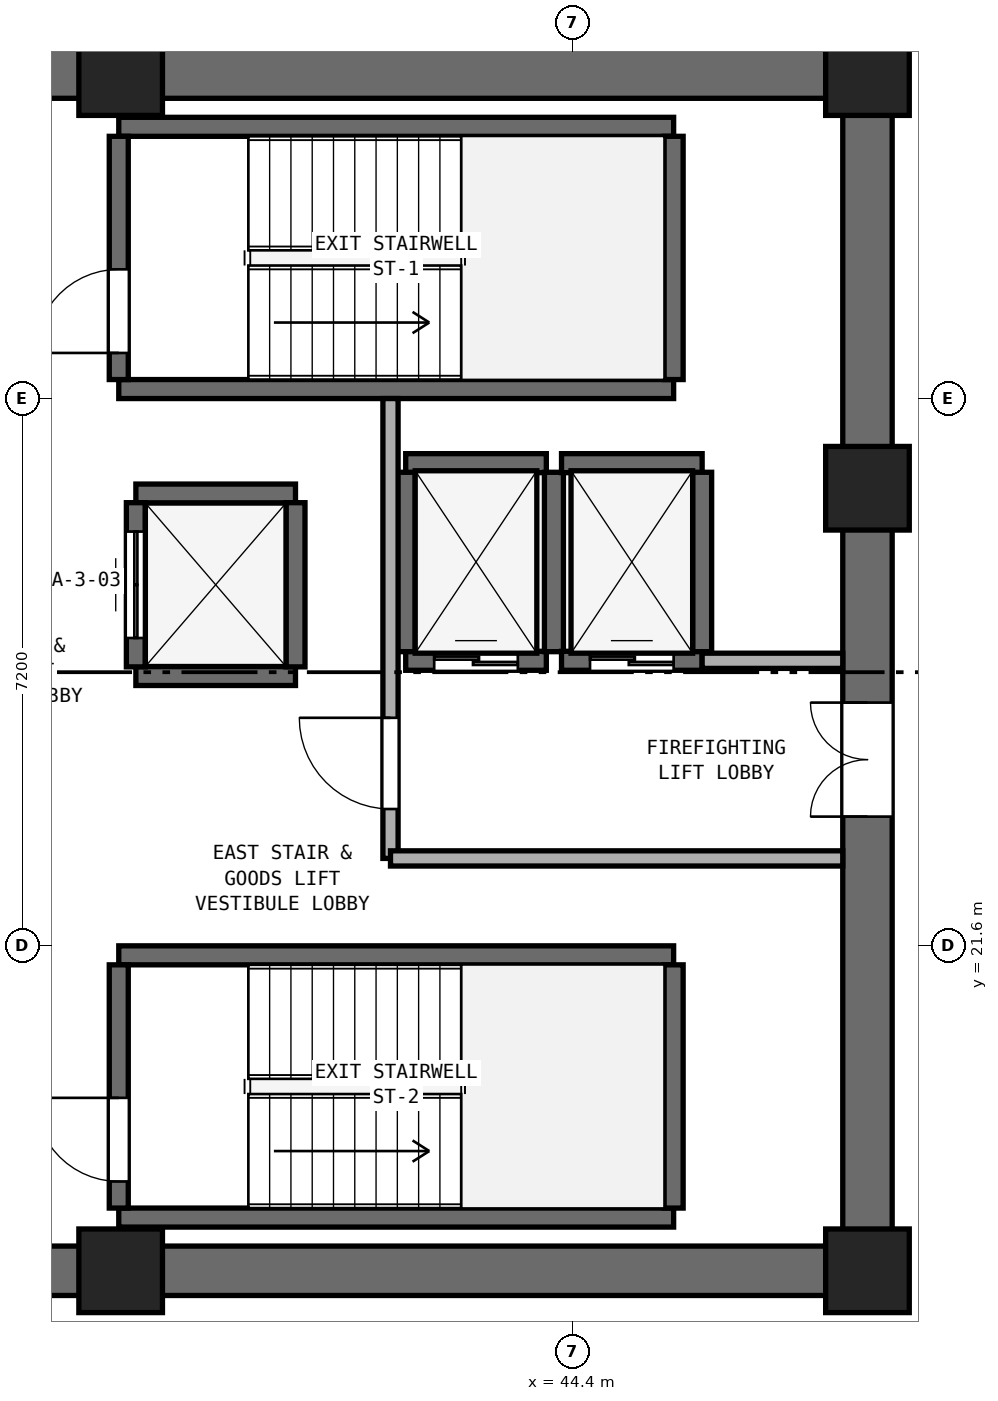
"""IFC4 building model, lengths in metres.
Left out: names, types, materials, properties, quantities, classifications, styles, units other than length and angle.
Written with IfcOpenShell. Run it as: python <this file> out.ifc"""

import sys

from ifc_helpers import new_model, si_unit, direction, frame, frame_2d, origin, origin_2d, place, context, subcontext, project, spatial, rectangle, extrude, element, fill, save


model = new_model("IFC4")
c1 = context("Model", 3, precision=1e-05, world=origin(), true_north=direction((0.0, 1.0)))
c2 = subcontext(c1, "Body", "Model", "MODEL_VIEW")
j1 = project(units=[si_unit("LENGTHUNIT", "METRE"), si_unit("PLANEANGLEUNIT", "RADIAN")], contexts=[c1])
p1 = place(None, origin())
s1 = spatial("IfcSite", under=j1, at=p1, CompositionType="ELEMENT")
p2 = place(p1, origin())
s2 = spatial("IfcBuilding", under=s1, at=p2, CompositionType="ELEMENT")
p3 = place(p2, frame((0.0, 0.0, 116.2)))
s3 = spatial("IfcBuildingStorey", under=s2, at=p3, CompositionType="ELEMENT", Elevation=116.2)
for number, where, z_axis, x_axis in (
    (1, (25.4, 17.325, 0.0), (0.0, 0.0, 1.0), (1.0, 0.0, 0.0)),
    (2, (25.4, 33.075, 0.0), (0.0, 0.0, 1.0), (1.0, 0.0, 0.0)),
):
    element("IfcWall", number, at=place(p3, frame(where, z_axis=z_axis, x_axis=x_axis)), inside=s3, PredefinedType="SHEAR", context=c2, shape_type="SweptSolid", body=[
        extrude(rectangle(XDim=23.2, YDim=0.65, at=frame_2d((11.6, 0.0))), origin(), (0.0, 0.0, 1.0), 3.4),
    ])
p4 = place(p3, frame((48.275, 17.65, 0.0), z_axis=(0.0, 0.0, 1.0), x_axis=(0.0, 1.0, 0.0)))
e3 = element("IfcWall", 3, at=p4, inside=s3, PredefinedType="SHEAR", context=c2, shape_type="SweptSolid", body=[
    extrude(rectangle(XDim=15.1, YDim=0.65, at=frame_2d((7.55, 0.0))), origin(), (0.0, 0.0, 1.0), 3.4),
])
p5 = place(p4, frame((5.65, 0.0, 0.0)))
e4 = element("IfcOpeningElement", 4, at=p5, cuts=e3, PredefinedType="OPENING", context=c2, shape_type="SweptSolid", body=[
    extrude(rectangle(XDim=1.5, YDim=2.15, at=frame_2d((0.75, 1.075))), frame((0.0, 0.335, 0.0), z_axis=(0.0, -1.0, 0.0), x_axis=(1.0, 0.0, 0.0)), (0.0, 0.0, 1.0), 0.67),
])
for number, where, z_axis, x_axis in (
    (5, (38.45, 17.325, 0.0), (0.0, 0.0, 1.0), (1.0, 0.0, 0.0)),
    (6, (48.275, 17.325, 0.0), (0.0, 0.0, 1.0), (1.0, 0.0, 0.0)),
    (7, (48.275, 27.62, 0.0), (0.0, 0.0, 1.0), (1.0, 0.0, 0.0)),
    (8, (48.275, 33.075, 0.0), (0.0, 0.0, 1.0), (1.0, 0.0, 0.0)),
    (9, (38.45, 33.075, 0.0), (0.0, 0.0, 1.0), (1.0, 0.0, 0.0)),
):
    element("IfcColumn", number, at=place(p3, frame(where, z_axis=z_axis, x_axis=x_axis)), inside=s3, PredefinedType="PILASTER", context=c2, shape_type="SweptSolid", body=[
        extrude(rectangle(XDim=1.1, YDim=1.1, at=origin_2d()), origin(), (0.0, 0.0, 1.0), 3.8),
    ])
for number, where, z_axis, x_axis in (
    (10, (38.425, 28.925, 0.0), (0.0, 0.0, 1.0), (1.0, 0.0, 0.0)),
    (11, (38.425, 32.375, 0.0), (0.0, 0.0, 1.0), (1.0, 0.0, 0.0)),
):
    element("IfcWall", number, at=place(p3, frame(where, z_axis=z_axis, x_axis=x_axis)), inside=s3, PredefinedType="SHEAR", context=c2, shape_type="SweptSolid", body=[
        extrude(rectangle(XDim=7.3, YDim=0.25, at=frame_2d((3.65, 0.0))), origin(), (0.0, 0.0, 1.0), 3.4),
    ])
p6 = place(p3, frame((38.425, 29.05, 0.0), z_axis=(0.0, 0.0, 1.0), x_axis=(0.0, 1.0, 0.0)))
e12 = element("IfcWall", 12, at=p6, inside=s3, PredefinedType="SHEAR", context=c2, shape_type="SweptSolid", body=[
    extrude(rectangle(XDim=3.2, YDim=0.25, at=frame_2d((1.6, 0.0))), origin(), (0.0, 0.0, 1.0), 3.4),
])
p7 = place(p6, frame((0.35, 0.0, 0.0)))
e13 = element("IfcOpeningElement", 13, at=p7, cuts=e12, PredefinedType="OPENING", context=c2, shape_type="SweptSolid", body=[
    extrude(rectangle(XDim=1.1, YDim=2.15, at=frame_2d((0.55, 1.075))), frame((0.0, 0.135, 0.0), z_axis=(0.0, -1.0, 0.0), x_axis=(1.0, 0.0, 0.0)), (0.0, 0.0, 1.0), 0.27),
])
p8 = place(p3, frame((45.725, 29.05, 0.0), z_axis=(0.0, 0.0, 1.0), x_axis=(0.0, 1.0, 0.0)))
e14 = element("IfcWall", 14, at=p8, inside=s3, PredefinedType="SHEAR", context=c2, shape_type="SweptSolid", body=[
    extrude(rectangle(XDim=3.2, YDim=0.25, at=frame_2d((1.6, 0.0))), origin(), (0.0, 0.0, 1.0), 3.4),
])
for number, where, z_axis, x_axis in (
    (15, (38.425, 18.025, 0.0), (0.0, 0.0, 1.0), (1.0, 0.0, 0.0)),
    (16, (38.425, 21.475, 0.0), (0.0, 0.0, 1.0), (1.0, 0.0, 0.0)),
):
    element("IfcWall", number, at=place(p3, frame(where, z_axis=z_axis, x_axis=x_axis)), inside=s3, PredefinedType="SHEAR", context=c2, shape_type="SweptSolid", body=[
        extrude(rectangle(XDim=7.3, YDim=0.25, at=frame_2d((3.65, 0.0))), origin(), (0.0, 0.0, 1.0), 3.4),
    ])
p9 = place(p3, frame((38.425, 18.15, 0.0), z_axis=(0.0, 0.0, 1.0), x_axis=(0.0, 1.0, 0.0)))
e17 = element("IfcWall", 17, at=p9, inside=s3, PredefinedType="SHEAR", context=c2, shape_type="SweptSolid", body=[
    extrude(rectangle(XDim=3.2, YDim=0.25, at=frame_2d((1.6, 0.0))), origin(), (0.0, 0.0, 1.0), 3.4),
])
p10 = place(p9, frame((0.35, 0.0, 0.0)))
e18 = element("IfcOpeningElement", 18, at=p10, cuts=e17, PredefinedType="OPENING", context=c2, shape_type="SweptSolid", body=[
    extrude(rectangle(XDim=1.1, YDim=2.15, at=frame_2d((0.55, 1.075))), frame((0.0, 0.135, 0.0), z_axis=(0.0, -1.0, 0.0), x_axis=(1.0, 0.0, 0.0)), (0.0, 0.0, 1.0), 0.27),
])
p11 = place(p3, frame((45.725, 18.15, 0.0), z_axis=(0.0, 0.0, 1.0), x_axis=(0.0, 1.0, 0.0)))
e19 = element("IfcWall", 19, at=p11, inside=s3, PredefinedType="SHEAR", context=c2, shape_type="SweptSolid", body=[
    extrude(rectangle(XDim=3.2, YDim=0.25, at=frame_2d((1.6, 0.0))), origin(), (0.0, 0.0, 1.0), 3.4),
])
p12 = place(p3, frame((42.2, 25.35, 0.0), z_axis=(0.0, 0.0, 1.0), x_axis=(1.0, 0.0, 0.0)))
e20 = element("IfcWall", 20, at=p12, inside=s3, PredefinedType="SHEAR", context=c2, shape_type="SweptSolid", body=[
    extrude(rectangle(XDim=1.85, YDim=0.25, at=frame_2d((0.925, 0.0))), origin(), (0.0, 0.0, 1.0), 3.4),
])
p13 = place(p12, frame((0.375, 0.0, 0.0)))
e21 = element("IfcOpeningElement", 21, at=p13, cuts=e20, PredefinedType="OPENING", context=c2, shape_type="SweptSolid", body=[
    extrude(rectangle(XDim=1.1, YDim=2.15, at=frame_2d((0.55, 1.075))), frame((0.0, 0.135, 0.0), z_axis=(0.0, -1.0, 0.0), x_axis=(1.0, 0.0, 0.0)), (0.0, 0.0, 1.0), 0.27),
])
p14 = place(p3, frame((42.2, 27.95, 0.0), z_axis=(0.0, 0.0, 1.0), x_axis=(1.0, 0.0, 0.0)))
e22 = element("IfcWall", 22, at=p14, inside=s3, PredefinedType="SHEAR", context=c2, shape_type="SweptSolid", body=[
    extrude(rectangle(XDim=1.85, YDim=0.25, at=frame_2d((0.925, 0.0))), origin(), (0.0, 0.0, 1.0), 3.4),
])
for number, where, z_axis, x_axis in (
    (23, (42.2, 25.47, 0.0), (0.0, 0.0, 1.0), (0.0, 1.0, 0.0)),
    (24, (44.15, 25.47, 0.0), (0.0, 0.0, 1.0), (0.0, 1.0, 0.0)),
):
    element("IfcWall", number, at=place(p3, frame(where, z_axis=z_axis, x_axis=x_axis)), inside=s3, PredefinedType="SHEAR", context=c2, shape_type="SweptSolid", body=[
        extrude(rectangle(XDim=2.36, YDim=0.25, at=frame_2d((1.18, 0.0))), origin(), (0.0, 0.0, 1.0), 3.4),
    ])
p15 = place(p3, frame((44.25, 25.35, 0.0), z_axis=(0.0, 0.0, 1.0), x_axis=(1.0, 0.0, 0.0)))
e25 = element("IfcWall", 25, at=p15, inside=s3, PredefinedType="SHEAR", context=c2, shape_type="SweptSolid", body=[
    extrude(rectangle(XDim=1.85, YDim=0.25, at=frame_2d((0.925, 0.0))), origin(), (0.0, 0.0, 1.0), 3.4),
])
p16 = place(p15, frame((0.375, 0.0, 0.0)))
e26 = element("IfcOpeningElement", 26, at=p16, cuts=e25, PredefinedType="OPENING", context=c2, shape_type="SweptSolid", body=[
    extrude(rectangle(XDim=1.1, YDim=2.15, at=frame_2d((0.55, 1.075))), frame((0.0, 0.135, 0.0), z_axis=(0.0, -1.0, 0.0), x_axis=(1.0, 0.0, 0.0)), (0.0, 0.0, 1.0), 0.27),
])
p17 = place(p3, frame((44.25, 27.95, 0.0), z_axis=(0.0, 0.0, 1.0), x_axis=(1.0, 0.0, 0.0)))
e27 = element("IfcWall", 27, at=p17, inside=s3, PredefinedType="SHEAR", context=c2, shape_type="SweptSolid", body=[
    extrude(rectangle(XDim=1.85, YDim=0.25, at=frame_2d((0.925, 0.0))), origin(), (0.0, 0.0, 1.0), 3.4),
])
p18 = place(p3, frame((46.1, 25.47, 0.0), z_axis=(0.0, 0.0, 1.0), x_axis=(0.0, 1.0, 0.0)))
e28 = element("IfcWall", 28, at=p18, inside=s3, PredefinedType="SHEAR", context=c2, shape_type="SweptSolid", body=[
    extrude(rectangle(XDim=2.36, YDim=0.25, at=frame_2d((1.18, 0.0))), origin(), (0.0, 0.0, 1.0), 3.4),
])
for number, where, z_axis, x_axis in (
    (29, (38.65, 25.15, 0.0), (0.0, 0.0, 1.0), (1.0, 0.0, 0.0)),
    (30, (38.65, 27.55, 0.0), (0.0, 0.0, 1.0), (1.0, 0.0, 0.0)),
):
    element("IfcWall", number, at=place(p3, frame(where, z_axis=z_axis, x_axis=x_axis)), inside=s3, PredefinedType="SHEAR", context=c2, shape_type="SweptSolid", body=[
        extrude(rectangle(XDim=2.1, YDim=0.25, at=frame_2d((1.05, 0.0))), origin(), (0.0, 0.0, 1.0), 3.4),
    ])
p19 = place(p3, frame((38.65, 25.27, 0.0), z_axis=(0.0, 0.0, 1.0), x_axis=(0.0, 1.0, 0.0)))
e31 = element("IfcWall", 31, at=p19, inside=s3, PredefinedType="SHEAR", context=c2, shape_type="SweptSolid", body=[
    extrude(rectangle(XDim=2.16, YDim=0.25, at=frame_2d((1.08, 0.0))), origin(), (0.0, 0.0, 1.0), 3.4),
])
p20 = place(p19, frame((0.38, 0.0, 0.0)))
e32 = element("IfcOpeningElement", 32, at=p20, cuts=e31, PredefinedType="OPENING", context=c2, shape_type="SweptSolid", body=[
    extrude(rectangle(XDim=1.4, YDim=2.2, at=frame_2d((0.7, 1.1))), frame((0.0, 0.135, 0.0), z_axis=(0.0, -1.0, 0.0), x_axis=(1.0, 0.0, 0.0)), (0.0, 0.0, 1.0), 0.27),
])
p21 = place(p3, frame((40.75, 25.27, 0.0), z_axis=(0.0, 0.0, 1.0), x_axis=(0.0, 1.0, 0.0)))
e33 = element("IfcWall", 33, at=p21, inside=s3, PredefinedType="SHEAR", context=c2, shape_type="SweptSolid", body=[
    extrude(rectangle(XDim=2.16, YDim=0.25, at=frame_2d((1.08, 0.0))), origin(), (0.0, 0.0, 1.0), 3.4),
])
p22 = place(p3, frame((42.0, 22.75, 0.0), z_axis=(0.0, 0.0, 1.0), x_axis=(0.0, 1.0, 0.0)))
e34 = element("IfcWall", 34, at=p22, inside=s3, PredefinedType="SOLIDWALL", context=c2, shape_type="SweptSolid", body=[
    extrude(rectangle(XDim=6.05, YDim=0.2, at=frame_2d((3.025, 0.0))), origin(), (0.0, 0.0, 1.0), 3.4),
])
p23 = place(p22, frame((0.65, 0.0, 0.0)))
e35 = element("IfcOpeningElement", 35, at=p23, cuts=e34, PredefinedType="OPENING", context=c2, shape_type="SweptSolid", body=[
    extrude(rectangle(XDim=1.2, YDim=2.15, at=frame_2d((0.6, 1.075))), frame((0.0, 0.11, 0.0), z_axis=(0.0, -1.0, 0.0), x_axis=(1.0, 0.0, 0.0)), (0.0, 0.0, 1.0), 0.22),
])
p24 = place(p3, frame((42.0, 22.75, 0.0), z_axis=(0.0, 0.0, 1.0), x_axis=(1.0, 0.0, 0.0)))
e36 = element("IfcWall", 36, at=p24, inside=s3, PredefinedType="SOLIDWALL", context=c2, shape_type="SweptSolid", body=[
    extrude(rectangle(XDim=5.95, YDim=0.2, at=frame_2d((2.975, 0.0))), origin(), (0.0, 0.0, 1.0), 3.4),
])
p25 = place(p3, frame((46.1, 25.35, 0.0), z_axis=(0.0, 0.0, 1.0), x_axis=(1.0, 0.0, 0.0)))
e37 = element("IfcWall", 37, at=p25, inside=s3, PredefinedType="SOLIDWALL", context=c2, shape_type="SweptSolid", body=[
    extrude(rectangle(XDim=1.85, YDim=0.2, at=frame_2d((0.925, 0.0))), origin(), (0.0, 0.0, 1.0), 3.4),
])
p26 = place(p7, origin())
e38 = element("IfcDoor", 38, at=p26, inside=s3, OperationType="SINGLE_SWING_LEFT", PredefinedType="DOOR", context=c2, shape_type="SweptSolid", body=[
    extrude(rectangle(XDim=1.1, YDim=2.15, at=frame_2d((0.55, 1.075))), frame((0.0, 0.025, 0.0), z_axis=(0.0, -1.0, 0.0), x_axis=(1.0, 0.0, 0.0)), (0.0, 0.0, 1.0), 0.05),
])
fill(e13, e38)
p27 = place(p10, origin())
e39 = element("IfcDoor", 39, at=p27, inside=s3, OperationType="SINGLE_SWING_RIGHT", PredefinedType="DOOR", context=c2, shape_type="SweptSolid", body=[
    extrude(rectangle(XDim=1.1, YDim=2.15, at=frame_2d((0.55, 1.075))), frame((0.0, 0.025, 0.0), z_axis=(0.0, -1.0, 0.0), x_axis=(1.0, 0.0, 0.0)), (0.0, 0.0, 1.0), 0.05),
])
fill(e18, e39)
p28 = place(p13, origin())
e40 = element("IfcDoor", 40, at=p28, inside=s3, OperationType="DOUBLE_DOOR_SLIDING", PredefinedType="DOOR", context=c2, shape_type="SweptSolid", body=[
    extrude(rectangle(XDim=1.1, YDim=2.15, at=frame_2d((0.55, 1.075))), frame((0.0, 0.025, 0.0), z_axis=(0.0, -1.0, 0.0), x_axis=(1.0, 0.0, 0.0)), (0.0, 0.0, 1.0), 0.05),
])
fill(e21, e40)
p29 = place(p16, origin())
e41 = element("IfcDoor", 41, at=p29, inside=s3, OperationType="DOUBLE_DOOR_SLIDING", PredefinedType="DOOR", context=c2, shape_type="SweptSolid", body=[
    extrude(rectangle(XDim=1.1, YDim=2.15, at=frame_2d((0.55, 1.075))), frame((0.0, 0.025, 0.0), z_axis=(0.0, -1.0, 0.0), x_axis=(1.0, 0.0, 0.0)), (0.0, 0.0, 1.0), 0.05),
])
fill(e26, e41)
p30 = place(p20, origin())
e42 = element("IfcDoor", 42, at=p30, inside=s3, OperationType="DOUBLE_DOOR_SLIDING", PredefinedType="DOOR", context=c2, shape_type="SweptSolid", body=[
    extrude(rectangle(XDim=1.4, YDim=2.2, at=frame_2d((0.7, 1.1))), frame((0.0, 0.025, 0.0), z_axis=(0.0, -1.0, 0.0), x_axis=(1.0, 0.0, 0.0)), (0.0, 0.0, 1.0), 0.05),
])
fill(e32, e42)
p31 = place(p23, origin())
e43 = element("IfcDoor", 43, at=p31, inside=s3, OperationType="SINGLE_SWING_RIGHT", PredefinedType="DOOR", context=c2, shape_type="SweptSolid", body=[
    extrude(rectangle(XDim=1.2, YDim=2.15, at=frame_2d((0.6, 1.075))), frame((0.0, 0.025, 0.0), z_axis=(0.0, -1.0, 0.0), x_axis=(1.0, 0.0, 0.0)), (0.0, 0.0, 1.0), 0.05),
])
fill(e35, e43)
p32 = place(p5, origin())
e44 = element("IfcDoor", 44, at=p32, inside=s3, OperationType="DOUBLE_DOOR_SINGLE_SWING", PredefinedType="DOOR", context=c2, shape_type="SweptSolid", body=[
    extrude(rectangle(XDim=1.5, YDim=2.15, at=frame_2d((0.75, 1.075))), frame((0.0, 0.025, 0.0), z_axis=(0.0, -1.0, 0.0), x_axis=(1.0, 0.0, 0.0)), (0.0, 0.0, 1.0), 0.05),
])
fill(e4, e44)
save(model, sys.argv[1])
